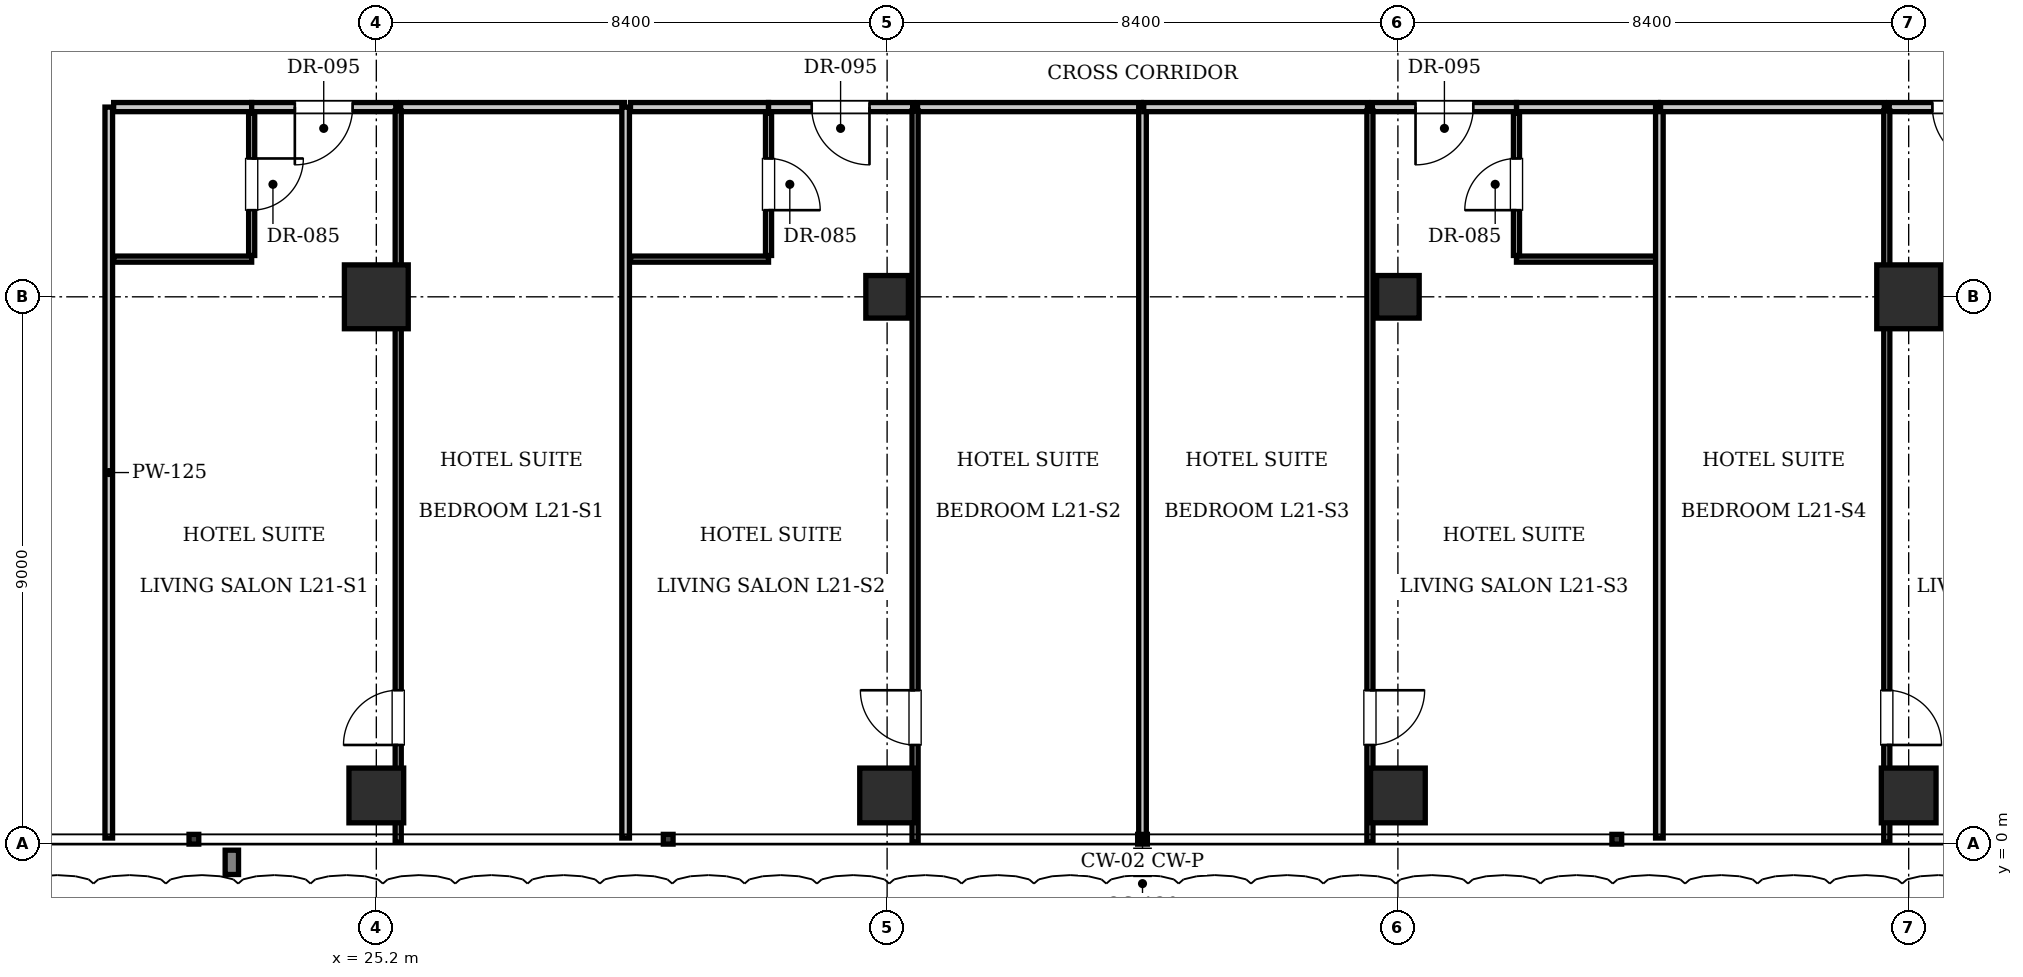
"""IFC4 building model, lengths in metres.
Left out: names, types, materials, properties, quantities, classifications, styles, units other than length and angle.
Written with IfcOpenShell. Run it as: python <this file> out.ifc"""

import sys

from ifc_helpers import new_model, si_unit, direction, frame, frame_2d, origin, origin_2d, place, context, subcontext, project, spatial, rectangle, i_section, extrude, element, fill, save


model = new_model("IFC4")
c1 = context("Model", 3, precision=1e-05, world=origin(), true_north=direction((0.0, 1.0)))
c2 = subcontext(c1, "Body", "Model", "MODEL_VIEW")
j1 = project(units=[si_unit("LENGTHUNIT", "METRE"), si_unit("PLANEANGLEUNIT", "RADIAN")], contexts=[c1])
p1 = place(None, origin())
s1 = spatial("IfcSite", under=j1, at=p1, CompositionType="ELEMENT")
p2 = place(p1, origin())
s2 = spatial("IfcBuilding", under=s1, at=p2, CompositionType="ELEMENT")
p3 = place(p2, frame((0.0, 0.0, 88.55)))
s3 = spatial("IfcBuildingStorey", under=s2, at=p3, CompositionType="ELEMENT", Elevation=88.55)
for number, where, z_axis, x_axis in (
    (1, (25.2, 9.0, 0.0), (0.0, 0.0, 1.0), (1.0, 0.0, 0.0)),
    (2, (50.4, 9.0, 0.0), (0.0, 0.0, 1.0), (1.0, 0.0, 0.0)),
):
    element("IfcColumn", number, at=place(p3, frame(where, z_axis=z_axis, x_axis=x_axis)), inside=s3, PredefinedType="COLUMN", context=c2, shape_type="SweptSolid", body=[
        extrude(rectangle(XDim=1.05, YDim=1.05, at=origin_2d()), origin(), (0.0, 0.0, 1.0), 3.85),
    ])
for number, where, z_axis, x_axis in (
    (3, (33.6, 9.0, 0.0), (0.0, 0.0, 1.0), (1.0, 0.0, 0.0)),
    (4, (42.0, 9.0, 0.0), (0.0, 0.0, 1.0), (1.0, 0.0, 0.0)),
):
    element("IfcColumn", number, at=place(p3, frame(where, z_axis=z_axis, x_axis=x_axis)), inside=s3, PredefinedType="COLUMN", context=c2, shape_type="SweptSolid", body=[
        extrude(i_section(OverallWidth=0.7, OverallDepth=0.7, WebThickness=0.028, FlangeThickness=0.044, at=origin_2d()), origin(), (0.0, 0.0, 1.0), 3.85),
    ])
for number, where, z_axis, x_axis in (
    (5, (25.2, 0.8, 0.0), (0.0, 0.0, 1.0), (1.0, 0.0, 0.0)),
    (6, (33.6, 0.8, 0.0), (0.0, 0.0, 1.0), (1.0, 0.0, 0.0)),
    (7, (42.0, 0.8, 0.0), (0.0, 0.0, 1.0), (1.0, 0.0, 0.0)),
    (8, (50.4, 0.8, 0.0), (0.0, 0.0, 1.0), (1.0, 0.0, 0.0)),
):
    element("IfcColumn", number, at=place(p3, frame(where, z_axis=z_axis, x_axis=x_axis)), inside=s3, PredefinedType="COLUMN", context=c2, shape_type="SweptSolid", body=[
        extrude(rectangle(XDim=0.9, YDim=0.9, at=origin_2d()), origin(), (0.0, 0.0, 1.0), 3.85),
    ])
p4 = place(p3, frame((20.8, 0.1, 0.0), z_axis=(0.0, 0.0, 1.0), x_axis=(0.0, 1.0, 0.0)))
e9 = element("IfcWall", 9, at=p4, inside=s3, PredefinedType="PARTITIONING", context=c2, shape_type="SweptSolid", body=[
    extrude(rectangle(XDim=12.02, YDim=0.125, at=frame_2d((6.01, 0.0))), origin(), (0.0, 0.0, 1.0), 3.61),
])
p5 = place(p3, frame((20.88, 12.12, 0.0), z_axis=(0.0, 0.0, 1.0), x_axis=(1.0, 0.0, 0.0)))
e10 = element("IfcWall", 10, at=p5, inside=s3, PredefinedType="PARTITIONING", context=c2, shape_type="SweptSolid", body=[
    extrude(rectangle(XDim=2.27, YDim=0.15, at=frame_2d((1.135, 0.0))), origin(), (0.0, 0.0, 1.0), 3.61),
])
p6 = place(p3, frame((20.88, 9.62, 0.0), z_axis=(0.0, 0.0, 1.0), x_axis=(1.0, 0.0, 0.0)))
e11 = element("IfcWall", 11, at=p6, inside=s3, PredefinedType="PARTITIONING", context=c2, shape_type="SweptSolid", body=[
    extrude(rectangle(XDim=2.27, YDim=0.1, at=frame_2d((1.135, 0.0))), origin(), (0.0, 0.0, 1.0), 3.61),
])
p7 = place(p3, frame((23.15, 9.68, 0.0), z_axis=(0.0, 0.0, 1.0), x_axis=(0.0, 1.0, 0.0)))
e12 = element("IfcWall", 12, at=p7, inside=s3, PredefinedType="PARTITIONING", context=c2, shape_type="SweptSolid", body=[
    extrude(rectangle(XDim=2.34, YDim=0.1, at=frame_2d((1.17, 0.0))), origin(), (0.0, 0.0, 1.0), 3.61),
])
p8 = place(p7, frame((0.745, 0.0, 0.0)))
e13 = element("IfcOpeningElement", 13, at=p8, cuts=e12, PredefinedType="OPENING", context=c2, shape_type="SweptSolid", body=[
    extrude(rectangle(XDim=0.85, YDim=2.1, at=frame_2d((0.425, 1.05))), frame((0.0, 0.06, 0.0), z_axis=(0.0, -1.0, 0.0), x_axis=(1.0, 0.0, 0.0)), (0.0, 0.0, 1.0), 0.12),
])
p9 = place(p3, frame((23.15, 12.12, 0.0), z_axis=(0.0, 0.0, 1.0), x_axis=(1.0, 0.0, 0.0)))
e14 = element("IfcWall", 14, at=p9, inside=s3, PredefinedType="PARTITIONING", context=c2, shape_type="SweptSolid", body=[
    extrude(rectangle(XDim=2.37, YDim=0.15, at=frame_2d((1.185, 0.0))), origin(), (0.0, 0.0, 1.0), 3.61),
])
p10 = place(p9, frame((0.71, 0.0, 0.0)))
e15 = element("IfcOpeningElement", 15, at=p10, cuts=e14, PredefinedType="OPENING", context=c2, shape_type="SweptSolid", body=[
    extrude(rectangle(XDim=0.95, YDim=2.15, at=frame_2d((0.475, 1.075))), frame((0.0, 0.085, 0.0), z_axis=(0.0, -1.0, 0.0), x_axis=(1.0, 0.0, 0.0)), (0.0, 0.0, 1.0), 0.17),
])
p11 = place(p3, frame((25.6, 12.12, 0.0), z_axis=(0.0, 0.0, 1.0), x_axis=(1.0, 0.0, 0.0)))
e16 = element("IfcWall", 16, at=p11, inside=s3, PredefinedType="PARTITIONING", context=c2, shape_type="SweptSolid", body=[
    extrude(rectangle(XDim=3.68, YDim=0.15, at=frame_2d((1.84, 0.0))), origin(), (0.0, 0.0, 1.0), 3.61),
])
p12 = place(p3, frame((25.56, 0.03, 0.0), z_axis=(0.0, 0.0, 1.0), x_axis=(0.0, 1.0, 0.0)))
e17 = element("IfcWall", 17, at=p12, inside=s3, PredefinedType="PARTITIONING", context=c2, shape_type="SweptSolid", body=[
    extrude(rectangle(XDim=12.03, YDim=0.1, at=frame_2d((6.015, 0.0))), origin(), (0.0, 0.0, 1.0), 3.61),
])
p13 = place(p12, frame((1.6, 0.0, 0.0)))
e18 = element("IfcOpeningElement", 18, at=p13, cuts=e17, PredefinedType="OPENING", context=c2, shape_type="SweptSolid", body=[
    extrude(rectangle(XDim=0.9, YDim=2.1, at=frame_2d((0.45, 1.05))), frame((0.0, 0.06, 0.0), z_axis=(0.0, -1.0, 0.0), x_axis=(1.0, 0.0, 0.0)), (0.0, 0.0, 1.0), 0.12),
])
p14 = place(p3, frame((29.3, 0.1, 0.0), z_axis=(0.0, 0.0, 1.0), x_axis=(0.0, 1.0, 0.0)))
e19 = element("IfcWall", 19, at=p14, inside=s3, PredefinedType="PARTITIONING", context=c2, shape_type="SweptSolid", body=[
    extrude(rectangle(XDim=12.02, YDim=0.125, at=frame_2d((6.01, 0.0))), origin(), (0.0, 0.0, 1.0), 3.255),
])
p15 = place(p3, frame((29.38, 12.12, 0.0), z_axis=(0.0, 0.0, 1.0), x_axis=(1.0, 0.0, 0.0)))
e20 = element("IfcWall", 20, at=p15, inside=s3, PredefinedType="PARTITIONING", context=c2, shape_type="SweptSolid", body=[
    extrude(rectangle(XDim=2.27, YDim=0.15, at=frame_2d((1.135, 0.0))), origin(), (0.0, 0.0, 1.0), 3.61),
])
p16 = place(p3, frame((29.38, 9.62, 0.0), z_axis=(0.0, 0.0, 1.0), x_axis=(1.0, 0.0, 0.0)))
e21 = element("IfcWall", 21, at=p16, inside=s3, PredefinedType="PARTITIONING", context=c2, shape_type="SweptSolid", body=[
    extrude(rectangle(XDim=2.27, YDim=0.1, at=frame_2d((1.135, 0.0))), origin(), (0.0, 0.0, 1.0), 3.61),
])
p17 = place(p3, frame((31.65, 9.68, 0.0), z_axis=(0.0, 0.0, 1.0), x_axis=(0.0, 1.0, 0.0)))
e22 = element("IfcWall", 22, at=p17, inside=s3, PredefinedType="PARTITIONING", context=c2, shape_type="SweptSolid", body=[
    extrude(rectangle(XDim=2.34, YDim=0.1, at=frame_2d((1.17, 0.0))), origin(), (0.0, 0.0, 1.0), 3.61),
])
p18 = place(p17, frame((0.745, 0.0, 0.0)))
e23 = element("IfcOpeningElement", 23, at=p18, cuts=e22, PredefinedType="OPENING", context=c2, shape_type="SweptSolid", body=[
    extrude(rectangle(XDim=0.85, YDim=2.1, at=frame_2d((0.425, 1.05))), frame((0.0, 0.06, 0.0), z_axis=(0.0, -1.0, 0.0), x_axis=(1.0, 0.0, 0.0)), (0.0, 0.0, 1.0), 0.12),
])
p19 = place(p3, frame((31.65, 12.12, 0.0), z_axis=(0.0, 0.0, 1.0), x_axis=(1.0, 0.0, 0.0)))
e24 = element("IfcWall", 24, at=p19, inside=s3, PredefinedType="PARTITIONING", context=c2, shape_type="SweptSolid", body=[
    extrude(rectangle(XDim=2.37, YDim=0.15, at=frame_2d((1.185, 0.0))), origin(), (0.0, 0.0, 1.0), 3.61),
])
p20 = place(p19, frame((0.71, 0.0, 0.0)))
e25 = element("IfcOpeningElement", 25, at=p20, cuts=e24, PredefinedType="OPENING", context=c2, shape_type="SweptSolid", body=[
    extrude(rectangle(XDim=0.95, YDim=2.15, at=frame_2d((0.475, 1.075))), frame((0.0, 0.085, 0.0), z_axis=(0.0, -1.0, 0.0), x_axis=(1.0, 0.0, 0.0)), (0.0, 0.0, 1.0), 0.17),
])
p21 = place(p3, frame((34.1, 12.12, 0.0), z_axis=(0.0, 0.0, 1.0), x_axis=(1.0, 0.0, 0.0)))
e26 = element("IfcWall", 26, at=p21, inside=s3, PredefinedType="PARTITIONING", context=c2, shape_type="SweptSolid", body=[
    extrude(rectangle(XDim=3.68, YDim=0.15, at=frame_2d((1.84, 0.0))), origin(), (0.0, 0.0, 1.0), 3.61),
])
p22 = place(p3, frame((34.06, 0.03, 0.0), z_axis=(0.0, 0.0, 1.0), x_axis=(0.0, 1.0, 0.0)))
e27 = element("IfcWall", 27, at=p22, inside=s3, PredefinedType="PARTITIONING", context=c2, shape_type="SweptSolid", body=[
    extrude(rectangle(XDim=12.03, YDim=0.1, at=frame_2d((6.015, 0.0))), origin(), (0.0, 0.0, 1.0), 3.61),
])
p23 = place(p22, frame((1.6, 0.0, 0.0)))
e28 = element("IfcOpeningElement", 28, at=p23, cuts=e27, PredefinedType="OPENING", context=c2, shape_type="SweptSolid", body=[
    extrude(rectangle(XDim=0.9, YDim=2.1, at=frame_2d((0.45, 1.05))), frame((0.0, 0.06, 0.0), z_axis=(0.0, -1.0, 0.0), x_axis=(1.0, 0.0, 0.0)), (0.0, 0.0, 1.0), 0.12),
])
p24 = place(p3, frame((37.8, 0.1, 0.0), z_axis=(0.0, 0.0, 1.0), x_axis=(0.0, 1.0, 0.0)))
e29 = element("IfcWall", 29, at=p24, inside=s3, PredefinedType="PARTITIONING", context=c2, shape_type="SweptSolid", body=[
    extrude(rectangle(XDim=12.02, YDim=0.125, at=frame_2d((6.01, 0.0))), origin(), (0.0, 0.0, 1.0), 3.293),
])
p25 = place(p3, frame((43.95, 12.12, 0.0), z_axis=(0.0, 0.0, 1.0), x_axis=(1.0, 0.0, 0.0)))
e30 = element("IfcWall", 30, at=p25, inside=s3, PredefinedType="PARTITIONING", context=c2, shape_type="SweptSolid", body=[
    extrude(rectangle(XDim=2.33, YDim=0.15, at=frame_2d((1.165, 0.0))), origin(), (0.0, 0.0, 1.0), 3.61),
])
p26 = place(p3, frame((43.95, 9.62, 0.0), z_axis=(0.0, 0.0, 1.0), x_axis=(1.0, 0.0, 0.0)))
e31 = element("IfcWall", 31, at=p26, inside=s3, PredefinedType="PARTITIONING", context=c2, shape_type="SweptSolid", body=[
    extrude(rectangle(XDim=2.31, YDim=0.1, at=frame_2d((1.155, 0.0))), origin(), (0.0, 0.0, 1.0), 3.61),
])
p27 = place(p3, frame((43.95, 9.68, 0.0), z_axis=(0.0, 0.0, 1.0), x_axis=(0.0, 1.0, 0.0)))
e32 = element("IfcWall", 32, at=p27, inside=s3, PredefinedType="PARTITIONING", context=c2, shape_type="SweptSolid", body=[
    extrude(rectangle(XDim=2.34, YDim=0.1, at=frame_2d((1.17, 0.0))), origin(), (0.0, 0.0, 1.0), 3.61),
])
p28 = place(p27, frame((0.745, 0.0, 0.0)))
e33 = element("IfcOpeningElement", 33, at=p28, cuts=e32, PredefinedType="OPENING", context=c2, shape_type="SweptSolid", body=[
    extrude(rectangle(XDim=0.85, YDim=2.1, at=frame_2d((0.425, 1.05))), frame((0.0, 0.06, 0.0), z_axis=(0.0, -1.0, 0.0), x_axis=(1.0, 0.0, 0.0)), (0.0, 0.0, 1.0), 0.12),
])
p29 = place(p3, frame((37.82, 12.12, 0.0), z_axis=(0.0, 0.0, 1.0), x_axis=(1.0, 0.0, 0.0)))
e34 = element("IfcWall", 34, at=p29, inside=s3, PredefinedType="PARTITIONING", context=c2, shape_type="SweptSolid", body=[
    extrude(rectangle(XDim=3.68, YDim=0.15, at=frame_2d((1.84, 0.0))), origin(), (0.0, 0.0, 1.0), 3.61),
])
p30 = place(p3, frame((41.58, 12.12, 0.0), z_axis=(0.0, 0.0, 1.0), x_axis=(1.0, 0.0, 0.0)))
e35 = element("IfcWall", 35, at=p30, inside=s3, PredefinedType="PARTITIONING", context=c2, shape_type="SweptSolid", body=[
    extrude(rectangle(XDim=2.37, YDim=0.15, at=frame_2d((1.185, 0.0))), origin(), (0.0, 0.0, 1.0), 3.61),
])
p31 = place(p30, frame((0.71, 0.0, 0.0)))
e36 = element("IfcOpeningElement", 36, at=p31, cuts=e35, PredefinedType="OPENING", context=c2, shape_type="SweptSolid", body=[
    extrude(rectangle(XDim=0.95, YDim=2.15, at=frame_2d((0.475, 1.075))), frame((0.0, 0.085, 0.0), z_axis=(0.0, -1.0, 0.0), x_axis=(1.0, 0.0, 0.0)), (0.0, 0.0, 1.0), 0.17),
])
p32 = place(p3, frame((41.54, 0.03, 0.0), z_axis=(0.0, 0.0, 1.0), x_axis=(0.0, 1.0, 0.0)))
e37 = element("IfcWall", 37, at=p32, inside=s3, PredefinedType="PARTITIONING", context=c2, shape_type="SweptSolid", body=[
    extrude(rectangle(XDim=12.03, YDim=0.1, at=frame_2d((6.015, 0.0))), origin(), (0.0, 0.0, 1.0), 3.61),
])
p33 = place(p32, frame((1.6, 0.0, 0.0)))
e38 = element("IfcOpeningElement", 38, at=p33, cuts=e37, PredefinedType="OPENING", context=c2, shape_type="SweptSolid", body=[
    extrude(rectangle(XDim=0.9, YDim=2.1, at=frame_2d((0.45, 1.05))), frame((0.0, 0.06, 0.0), z_axis=(0.0, -1.0, 0.0), x_axis=(1.0, 0.0, 0.0)), (0.0, 0.0, 1.0), 0.12),
])
p34 = place(p3, frame((46.3, 0.1, 0.0), z_axis=(0.0, 0.0, 1.0), x_axis=(0.0, 1.0, 0.0)))
e39 = element("IfcWall", 39, at=p34, inside=s3, PredefinedType="PARTITIONING", context=c2, shape_type="SweptSolid", body=[
    extrude(rectangle(XDim=12.02, YDim=0.125, at=frame_2d((6.01, 0.0))), origin(), (0.0, 0.0, 1.0), 3.344),
])
p35 = place(p3, frame((46.32, 12.12, 0.0), z_axis=(0.0, 0.0, 1.0), x_axis=(1.0, 0.0, 0.0)))
e40 = element("IfcWall", 40, at=p35, inside=s3, PredefinedType="PARTITIONING", context=c2, shape_type="SweptSolid", body=[
    extrude(rectangle(XDim=3.68, YDim=0.15, at=frame_2d((1.84, 0.0))), origin(), (0.0, 0.0, 1.0), 3.61),
])
p36 = place(p3, frame((50.08, 12.12, 0.0), z_axis=(0.0, 0.0, 1.0), x_axis=(1.0, 0.0, 0.0)))
e41 = element("IfcWall", 41, at=p36, inside=s3, PredefinedType="PARTITIONING", context=c2, shape_type="SweptSolid", body=[
    extrude(rectangle(XDim=2.37, YDim=0.15, at=frame_2d((1.185, 0.0))), origin(), (0.0, 0.0, 1.0), 3.61),
])
p37 = place(p36, frame((0.71, 0.0, 0.0)))
e42 = element("IfcOpeningElement", 42, at=p37, cuts=e41, PredefinedType="OPENING", context=c2, shape_type="SweptSolid", body=[
    extrude(rectangle(XDim=0.95, YDim=2.15, at=frame_2d((0.475, 1.075))), frame((0.0, 0.085, 0.0), z_axis=(0.0, -1.0, 0.0), x_axis=(1.0, 0.0, 0.0)), (0.0, 0.0, 1.0), 0.17),
])
p38 = place(p3, frame((50.04, 0.03, 0.0), z_axis=(0.0, 0.0, 1.0), x_axis=(0.0, 1.0, 0.0)))
e43 = element("IfcWall", 43, at=p38, inside=s3, PredefinedType="PARTITIONING", context=c2, shape_type="SweptSolid", body=[
    extrude(rectangle(XDim=12.03, YDim=0.1, at=frame_2d((6.015, 0.0))), origin(), (0.0, 0.0, 1.0), 3.61),
])
p39 = place(p38, frame((1.6, 0.0, 0.0)))
e44 = element("IfcOpeningElement", 44, at=p39, cuts=e43, PredefinedType="OPENING", context=c2, shape_type="SweptSolid", body=[
    extrude(rectangle(XDim=0.9, YDim=2.1, at=frame_2d((0.45, 1.05))), frame((0.0, 0.06, 0.0), z_axis=(0.0, -1.0, 0.0), x_axis=(1.0, 0.0, 0.0)), (0.0, 0.0, 1.0), 0.12),
])
p40 = place(p8, frame((0.85, 0.0, 0.0), z_axis=(0.0, 0.0, 1.0), x_axis=(-1.0, 0.0, 0.0)))
e45 = element("IfcDoor", 45, at=p40, inside=s3, OperationType="SINGLE_SWING_LEFT", PredefinedType="DOOR", context=c2, shape_type="SweptSolid", body=[
    extrude(rectangle(XDim=0.85, YDim=2.1, at=frame_2d((0.425, 1.05))), frame((0.0, 0.025, 0.0), z_axis=(0.0, -1.0, 0.0), x_axis=(1.0, 0.0, 0.0)), (0.0, 0.0, 1.0), 0.05),
])
fill(e13, e45)
p41 = place(p10, frame((0.95, 0.0, 0.0), z_axis=(0.0, 0.0, 1.0), x_axis=(-1.0, 0.0, 0.0)))
e46 = element("IfcDoor", 46, at=p41, inside=s3, OperationType="SINGLE_SWING_RIGHT", PredefinedType="DOOR", context=c2, shape_type="SweptSolid", body=[
    extrude(rectangle(XDim=0.95, YDim=2.15, at=frame_2d((0.475, 1.075))), frame((0.0, 0.025, 0.0), z_axis=(0.0, -1.0, 0.0), x_axis=(1.0, 0.0, 0.0)), (0.0, 0.0, 1.0), 0.05),
])
fill(e15, e46)
p42 = place(p13, origin())
e47 = element("IfcDoor", 47, at=p42, inside=s3, OperationType="SINGLE_SWING_LEFT", PredefinedType="DOOR", context=c2, shape_type="SweptSolid", body=[
    extrude(rectangle(XDim=0.9, YDim=2.1, at=frame_2d((0.45, 1.05))), frame((0.0, 0.025, 0.0), z_axis=(0.0, -1.0, 0.0), x_axis=(1.0, 0.0, 0.0)), (0.0, 0.0, 1.0), 0.05),
])
fill(e18, e47)
p43 = place(p18, frame((0.85, 0.0, 0.0), z_axis=(0.0, 0.0, 1.0), x_axis=(-1.0, 0.0, 0.0)))
e48 = element("IfcDoor", 48, at=p43, inside=s3, OperationType="SINGLE_SWING_RIGHT", PredefinedType="DOOR", context=c2, shape_type="SweptSolid", body=[
    extrude(rectangle(XDim=0.85, YDim=2.1, at=frame_2d((0.425, 1.05))), frame((0.0, 0.025, 0.0), z_axis=(0.0, -1.0, 0.0), x_axis=(1.0, 0.0, 0.0)), (0.0, 0.0, 1.0), 0.05),
])
fill(e23, e48)
p44 = place(p20, frame((0.95, 0.0, 0.0), z_axis=(0.0, 0.0, 1.0), x_axis=(-1.0, 0.0, 0.0)))
e49 = element("IfcDoor", 49, at=p44, inside=s3, OperationType="SINGLE_SWING_LEFT", PredefinedType="DOOR", context=c2, shape_type="SweptSolid", body=[
    extrude(rectangle(XDim=0.95, YDim=2.15, at=frame_2d((0.475, 1.075))), frame((0.0, 0.025, 0.0), z_axis=(0.0, -1.0, 0.0), x_axis=(1.0, 0.0, 0.0)), (0.0, 0.0, 1.0), 0.05),
])
fill(e25, e49)
p45 = place(p23, origin())
e50 = element("IfcDoor", 50, at=p45, inside=s3, OperationType="SINGLE_SWING_RIGHT", PredefinedType="DOOR", context=c2, shape_type="SweptSolid", body=[
    extrude(rectangle(XDim=0.9, YDim=2.1, at=frame_2d((0.45, 1.05))), frame((0.0, 0.025, 0.0), z_axis=(0.0, -1.0, 0.0), x_axis=(1.0, 0.0, 0.0)), (0.0, 0.0, 1.0), 0.05),
])
fill(e28, e50)
p46 = place(p28, origin())
e51 = element("IfcDoor", 51, at=p46, inside=s3, OperationType="SINGLE_SWING_LEFT", PredefinedType="DOOR", context=c2, shape_type="SweptSolid", body=[
    extrude(rectangle(XDim=0.85, YDim=2.1, at=frame_2d((0.425, 1.05))), frame((0.0, 0.025, 0.0), z_axis=(0.0, -1.0, 0.0), x_axis=(1.0, 0.0, 0.0)), (0.0, 0.0, 1.0), 0.05),
])
fill(e33, e51)
p47 = place(p31, frame((0.95, 0.0, 0.0), z_axis=(0.0, 0.0, 1.0), x_axis=(-1.0, 0.0, 0.0)))
e52 = element("IfcDoor", 52, at=p47, inside=s3, OperationType="SINGLE_SWING_RIGHT", PredefinedType="DOOR", context=c2, shape_type="SweptSolid", body=[
    extrude(rectangle(XDim=0.95, YDim=2.15, at=frame_2d((0.475, 1.075))), frame((0.0, 0.025, 0.0), z_axis=(0.0, -1.0, 0.0), x_axis=(1.0, 0.0, 0.0)), (0.0, 0.0, 1.0), 0.05),
])
fill(e36, e52)
p48 = place(p33, frame((0.9, 0.0, 0.0), z_axis=(0.0, 0.0, 1.0), x_axis=(-1.0, 0.0, 0.0)))
e53 = element("IfcDoor", 53, at=p48, inside=s3, OperationType="SINGLE_SWING_LEFT", PredefinedType="DOOR", context=c2, shape_type="SweptSolid", body=[
    extrude(rectangle(XDim=0.9, YDim=2.1, at=frame_2d((0.45, 1.05))), frame((0.0, 0.025, 0.0), z_axis=(0.0, -1.0, 0.0), x_axis=(1.0, 0.0, 0.0)), (0.0, 0.0, 1.0), 0.05),
])
fill(e38, e53)
p49 = place(p37, frame((0.95, 0.0, 0.0), z_axis=(0.0, 0.0, 1.0), x_axis=(-1.0, 0.0, 0.0)))
e54 = element("IfcDoor", 54, at=p49, inside=s3, OperationType="SINGLE_SWING_LEFT", PredefinedType="DOOR", context=c2, shape_type="SweptSolid", body=[
    extrude(rectangle(XDim=0.95, YDim=2.15, at=frame_2d((0.475, 1.075))), frame((0.0, 0.025, 0.0), z_axis=(0.0, -1.0, 0.0), x_axis=(1.0, 0.0, 0.0)), (0.0, 0.0, 1.0), 0.05),
])
fill(e42, e54)
p50 = place(p39, frame((0.9, 0.0, 0.0), z_axis=(0.0, 0.0, 1.0), x_axis=(-1.0, 0.0, 0.0)))
e55 = element("IfcDoor", 55, at=p50, inside=s3, OperationType="SINGLE_SWING_RIGHT", PredefinedType="DOOR", context=c2, shape_type="SweptSolid", body=[
    extrude(rectangle(XDim=0.9, YDim=2.1, at=frame_2d((0.45, 1.05))), frame((0.0, 0.025, 0.0), z_axis=(0.0, -1.0, 0.0), x_axis=(1.0, 0.0, 0.0)), (0.0, 0.0, 1.0), 0.05),
])
fill(e44, e55)
save(model, sys.argv[1])
